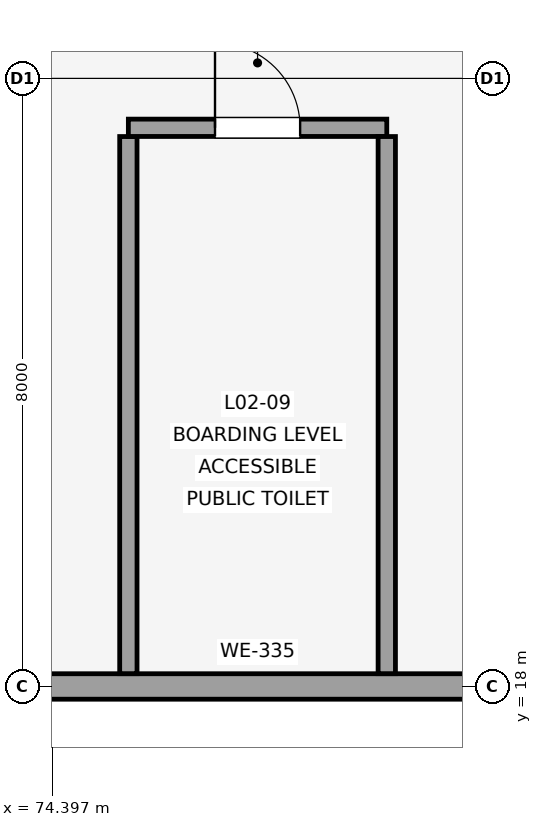
"""IFC4 building model, lengths in metres.
Left out: names, types, materials, properties, quantities, classifications, styles, units other than length and angle.
Written with IfcOpenShell. Run it as: python <this file> out.ifc"""

import sys

from ifc_helpers import new_model, si_unit, direction, frame, frame_2d, origin, place, context, subcontext, project, spatial, rectangle, extrude, element, fill, save


model = new_model("IFC4")
c1 = context("Model", 3, precision=1e-05, world=origin(), true_north=direction((0.0, 1.0)))
c2 = subcontext(c1, "Body", "Model", "MODEL_VIEW")
j1 = project(units=[si_unit("LENGTHUNIT", "METRE"), si_unit("PLANEANGLEUNIT", "RADIAN")], contexts=[c1])
p1 = place(None, origin())
s1 = spatial("IfcSite", under=j1, at=p1, CompositionType="ELEMENT")
p2 = place(p1, origin())
s2 = spatial("IfcBuilding", under=s1, at=p2, CompositionType="ELEMENT")
p3 = place(p2, frame((0.0, 0.0, 9.0)))
s3 = spatial("IfcBuildingStorey", under=s2, at=p3, CompositionType="ELEMENT", Elevation=9.0)
p4 = place(p3, frame((72.45, 18.0, 0.0), z_axis=(0.0, 0.0, 1.0), x_axis=(1.0, 0.0, 0.0)))
e1 = element("IfcWall", 1, at=p4, inside=s3, PredefinedType="SOLIDWALL", context=c2, shape_type="SweptSolid", body=[
    extrude(rectangle(XDim=9.3, YDim=0.335, at=frame_2d((4.65, 0.0))), origin(), (0.0, 0.0, 1.0), 3.42),
])
p5 = place(p3, frame((75.4, 18.168, 0.0), z_axis=(0.0, 0.0, 1.0), x_axis=(0.0, 1.0, 0.0)))
e2 = element("IfcWall", 2, at=p5, inside=s3, PredefinedType="PLUMBINGWALL", context=c2, shape_type="SweptSolid", body=[
    extrude(rectangle(XDim=7.067, YDim=0.228, at=frame_2d((3.533, 0.0))), origin(), (0.0, 0.0, 1.0), 2.7),
])
p6 = place(p3, frame((75.4, 25.35, 0.0), z_axis=(0.0, 0.0, 1.0), x_axis=(1.0, 0.0, 0.0)))
e3 = element("IfcWall", 3, at=p6, inside=s3, PredefinedType="PLUMBINGWALL", context=c2, shape_type="SweptSolid", body=[
    extrude(rectangle(XDim=3.4, YDim=0.228, at=frame_2d((1.7, 0.0))), origin(), (0.0, 0.0, 1.0), 2.7),
])
p7 = place(p6, frame((1.14, 0.0, 0.0)))
e4 = element("IfcOpeningElement", 4, at=p7, cuts=e3, PredefinedType="OPENING", context=c2, shape_type="SweptSolid", body=[
    extrude(rectangle(XDim=1.12, YDim=2.18, at=frame_2d((0.56, 1.09))), frame((0.0, 0.124, 0.0), z_axis=(0.0, -1.0, 0.0), x_axis=(1.0, 0.0, 0.0)), (0.0, 0.0, 1.0), 0.248),
])
p8 = place(p3, frame((78.8, 25.235, 0.0), z_axis=(0.0, 0.0, 1.0), x_axis=(0.0, -1.0, 0.0)))
e5 = element("IfcWall", 5, at=p8, inside=s3, PredefinedType="PLUMBINGWALL", context=c2, shape_type="SweptSolid", body=[
    extrude(rectangle(XDim=7.067, YDim=0.228, at=frame_2d((3.533, 0.0))), origin(), (0.0, 0.0, 1.0), 2.7),
])
p9 = place(p7, origin())
e6 = element("IfcDoor", 6, at=p9, inside=s3, OperationType="SINGLE_SWING_LEFT", PredefinedType="DOOR", context=c2, shape_type="SweptSolid", body=[
    extrude(rectangle(XDim=1.12, YDim=2.18, at=frame_2d((0.56, 1.09))), frame((0.0, 0.025, 0.0), z_axis=(0.0, -1.0, 0.0), x_axis=(1.0, 0.0, 0.0)), (0.0, 0.0, 1.0), 0.05),
])
fill(e4, e6)
save(model, sys.argv[1])
